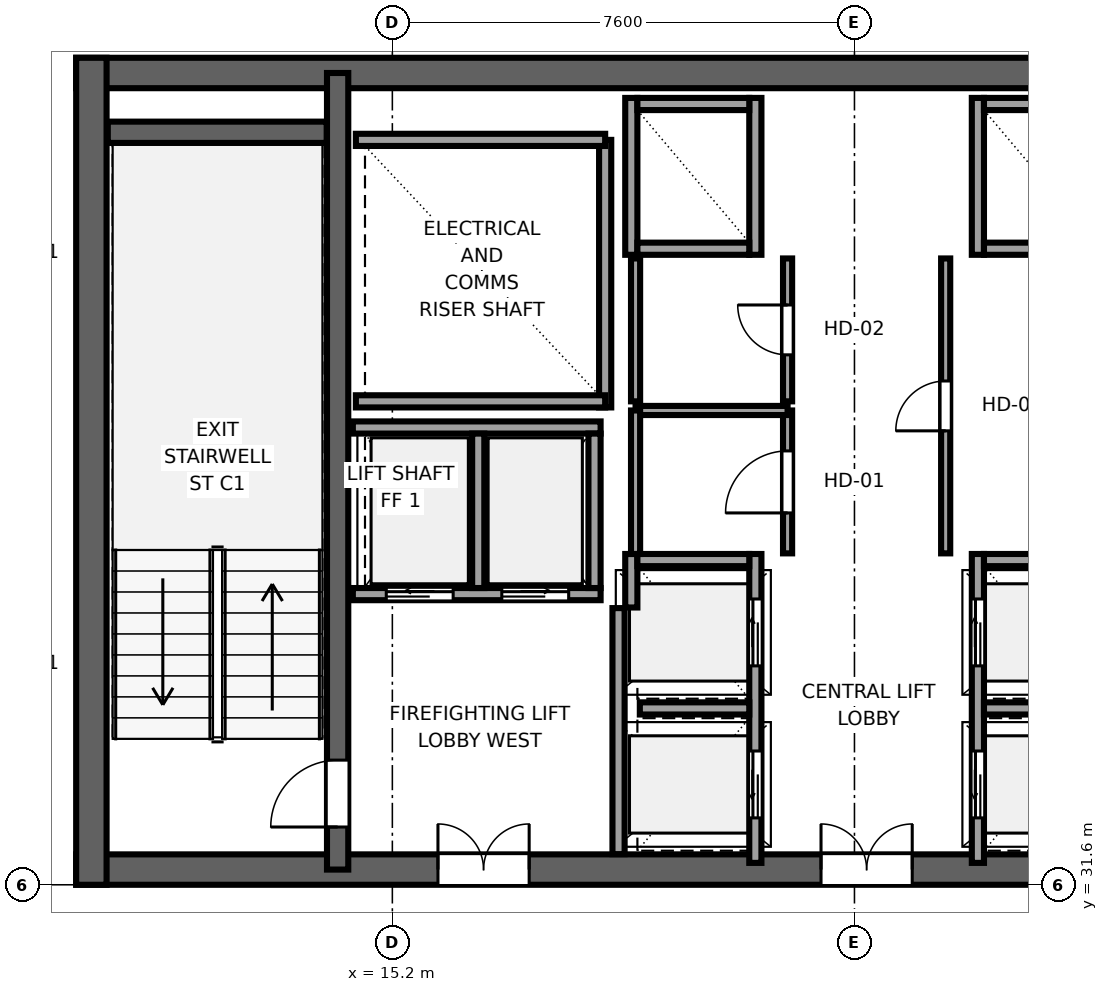
"""IFC4 building model, lengths in metres.
Left out: names, types, materials, properties, quantities, classifications, styles, units other than length and angle.
Written with IfcOpenShell. Run it as: python <this file> out.ifc"""

import sys

from ifc_helpers import new_model, si_unit, direction, frame, frame_2d, origin, place, context, subcontext, project, spatial, rectangle, extrude, source, transform, mapped, element, fill, save


model = new_model("IFC4")
c1 = context("Model", 3, precision=1e-05, world=origin(), true_north=direction((0.0, 1.0)))
c2 = subcontext(c1, "Body", "Model", "MODEL_VIEW")
j1 = project(units=[si_unit("LENGTHUNIT", "METRE"), si_unit("PLANEANGLEUNIT", "RADIAN")], contexts=[c1])
p1 = place(None, origin())
s1 = spatial("IfcSite", under=j1, at=p1, CompositionType="ELEMENT")
p2 = place(p1, origin())
s2 = spatial("IfcBuilding", under=s1, at=p2, CompositionType="ELEMENT")
p3 = place(p2, frame((0.0, 0.0, 213.25)))
s3 = spatial("IfcBuildingStorey", under=s2, at=p3, CompositionType="ELEMENT", Elevation=213.25)
p4 = place(p3, frame((10.0, 31.85, 0.0), z_axis=(0.0, 0.0, 1.0), x_axis=(1.0, 0.0, 0.0)))
e1 = element("IfcWall", 1, at=p4, inside=s3, PredefinedType="SHEAR", context=c2, shape_type="SweptSolid", body=[
    extrude(rectangle(XDim=26.0, YDim=0.5, at=frame_2d((13.0, 0.0))), origin(), (0.0, 0.0, 1.0), 3.55),
])
p5 = place(p4, frame((7.45, 0.0, 0.0), z_axis=(0.0, 0.0, 1.0), x_axis=(-1.0, 0.0, 0.0)))
e2 = element("IfcOpeningElement", 2, at=p5, cuts=e1, PredefinedType="OPENING", context=c2, shape_type="SweptSolid", body=[
    extrude(rectangle(XDim=1.5, YDim=2.04, at=frame_2d((0.75, 1.02))), frame((0.0, 0.26, 0.0), z_axis=(0.0, -1.0, 0.0), x_axis=(1.0, 0.0, 0.0)), (0.0, 0.0, 1.0), 0.52),
])
p6 = place(p4, frame((13.75, 0.0, 0.0), z_axis=(0.0, 0.0, 1.0), x_axis=(-1.0, 0.0, 0.0)))
e3 = element("IfcOpeningElement", 3, at=p6, cuts=e1, PredefinedType="OPENING", context=c2, shape_type="SweptSolid", body=[
    extrude(rectangle(XDim=1.5, YDim=2.04, at=frame_2d((0.75, 1.02))), frame((0.0, 0.26, 0.0), z_axis=(0.0, -1.0, 0.0), x_axis=(1.0, 0.0, 0.0)), (0.0, 0.0, 1.0), 0.52),
])
p7 = place(p4, frame((20.05, 0.0, 0.0), z_axis=(0.0, 0.0, 1.0), x_axis=(-1.0, 0.0, 0.0)))
e4 = element("IfcOpeningElement", 4, at=p7, cuts=e1, PredefinedType="OPENING", context=c2, shape_type="SweptSolid", body=[
    extrude(rectangle(XDim=1.5, YDim=2.04, at=frame_2d((0.75, 1.02))), frame((0.0, 0.26, 0.0), z_axis=(0.0, -1.0, 0.0), x_axis=(1.0, 0.0, 0.0)), (0.0, 0.0, 1.0), 0.52),
])
p8 = place(p3, frame((10.0, 44.95, 0.0), z_axis=(0.0, 0.0, 1.0), x_axis=(1.0, 0.0, 0.0)))
e5 = element("IfcWall", 5, at=p8, inside=s3, PredefinedType="SHEAR", context=c2, shape_type="SweptSolid", body=[
    extrude(rectangle(XDim=26.0, YDim=0.5, at=frame_2d((13.0, 0.0))), origin(), (0.0, 0.0, 1.0), 3.55),
])
p9 = place(p3, frame((10.25, 31.6, 0.0), z_axis=(0.0, 0.0, 1.0), x_axis=(0.0, 1.0, 0.0)))
e6 = element("IfcWall", 6, at=p9, inside=s3, PredefinedType="SHEAR", context=c2, shape_type="SweptSolid", body=[
    extrude(rectangle(XDim=13.6, YDim=0.5, at=frame_2d((6.8, 0.0))), origin(), (0.0, 0.0, 1.0), 3.55),
])
p10 = place(p3, frame((14.3, 31.85, 0.0), z_axis=(0.0, 0.0, 1.0), x_axis=(0.0, 1.0, 0.0)))
e7 = element("IfcWall", 7, at=p10, inside=s3, PredefinedType="SHEAR", context=c2, shape_type="SweptSolid", body=[
    extrude(rectangle(XDim=13.1, YDim=0.35, at=frame_2d((6.55, 0.0))), origin(), (0.0, 0.0, 1.0), 3.55),
])
p11 = place(p10, frame((0.7, 0.0, 0.0)))
e8 = element("IfcOpeningElement", 8, at=p11, cuts=e7, PredefinedType="OPENING", context=c2, shape_type="SweptSolid", body=[
    extrude(rectangle(XDim=1.1, YDim=2.12, at=frame_2d((0.55, 1.06))), frame((0.0, 0.185, 0.0), z_axis=(0.0, -1.0, 0.0), x_axis=(1.0, 0.0, 0.0)), (0.0, 0.0, 1.0), 0.37),
])
p12 = place(p3, frame((10.52, 43.975, 0.0), z_axis=(0.0, 0.0, 1.0), x_axis=(1.0, 0.0, 0.0)))
e9 = element("IfcWall", 9, at=p12, inside=s3, PredefinedType="SHEAR", context=c2, shape_type="SweptSolid", body=[
    extrude(rectangle(XDim=3.6, YDim=0.35, at=frame_2d((1.8, 0.0))), origin(), (0.0, 0.0, 1.0), 3.55),
])
p13 = place(p3, frame((18.7, 39.45, 0.0), z_axis=(0.0, 0.0, 1.0), x_axis=(0.0, 1.0, 0.0)))
e10 = element("IfcWall", 10, at=p13, inside=s3, PredefinedType="SOLIDWALL", context=c2, shape_type="SweptSolid", body=[
    extrude(rectangle(XDim=4.4, YDim=0.2, at=frame_2d((2.2, 0.0))), origin(), (0.0, 0.0, 1.0), 3.37),
])
for number, where, z_axis, x_axis in (
    (11, (14.6, 39.55, 0.0), (0.0, 0.0, 1.0), (1.0, 0.0, 0.0)),
    (12, (14.6, 43.85, 0.0), (0.0, 0.0, 1.0), (1.0, 0.0, 0.0)),
):
    element("IfcWall", number, at=place(p3, frame(where, z_axis=z_axis, x_axis=x_axis)), inside=s3, PredefinedType="SOLIDWALL", context=c2, shape_type="SweptSolid", body=[
        extrude(rectangle(XDim=4.1, YDim=0.2, at=frame_2d((2.05, 0.0))), origin(), (0.0, 0.0, 1.0), 3.37),
    ])
p14 = place(p3, frame((18.92, 32.104, 0.0), z_axis=(0.0, 0.0, 1.0), x_axis=(0.0, 1.0, 0.0)))
e13 = element("IfcWall", 13, at=p14, inside=s3, PredefinedType="SOLIDWALL", context=c2, shape_type="SweptSolid", body=[
    extrude(rectangle(XDim=4.046, YDim=0.2, at=frame_2d((2.023, 0.0))), origin(), (0.0, 0.0, 1.0), 3.37),
])
p15 = place(p3, frame((21.17, 31.96, 0.0), z_axis=(0.0, 0.0, 1.0), x_axis=(0.0, 1.0, 0.0)))
e14 = element("IfcWall", 14, at=p15, inside=s3, PredefinedType="SOLIDWALL", context=c2, shape_type="SweptSolid", body=[
    extrude(rectangle(XDim=5.08, YDim=0.2, at=frame_2d((2.54, 0.0))), origin(), (0.0, 0.0, 1.0), 3.37),
])
p16 = place(p15, frame((0.74, 0.0, 0.0)))
e15 = element("IfcOpeningElement", 15, at=p16, cuts=e14, PredefinedType="OPENING", context=c2, shape_type="SweptSolid", body=[
    extrude(rectangle(XDim=1.1, YDim=2.12, at=frame_2d((0.55, 1.06))), frame((0.0, 0.11, 0.0), z_axis=(0.0, -1.0, 0.0), x_axis=(1.0, 0.0, 0.0)), (0.0, 0.0, 1.0), 0.22),
])
p17 = place(p15, frame((3.24, 0.0, 0.0)))
e16 = element("IfcOpeningElement", 16, at=p17, cuts=e14, PredefinedType="OPENING", context=c2, shape_type="SweptSolid", body=[
    extrude(rectangle(XDim=1.1, YDim=2.12, at=frame_2d((0.55, 1.06))), frame((0.0, 0.11, 0.0), z_axis=(0.0, -1.0, 0.0), x_axis=(1.0, 0.0, 0.0)), (0.0, 0.0, 1.0), 0.22),
])
p18 = place(p3, frame((19.13, 36.16, 0.0), z_axis=(0.0, 0.0, 1.0), x_axis=(0.0, 1.0, 0.0)))
e17 = element("IfcWall", 17, at=p18, inside=s3, PredefinedType="SOLIDWALL", context=c2, shape_type="SweptSolid", body=[
    extrude(rectangle(XDim=0.88, YDim=0.2, at=frame_2d((0.44, 0.0))), origin(), (0.0, 0.0, 1.0), 3.37),
])
p19 = place(p3, frame((19.23, 36.94, 0.0), z_axis=(0.0, 0.0, 1.0), x_axis=(1.0, 0.0, 0.0)))
e18 = element("IfcWall", 18, at=p19, inside=s3, PredefinedType="SOLIDWALL", context=c2, shape_type="SweptSolid", body=[
    extrude(rectangle(XDim=1.84, YDim=0.2, at=frame_2d((0.92, 0.0))), origin(), (0.0, 0.0, 1.0), 3.37),
])
p20 = place(p3, frame((19.27, 34.5, 0.0), z_axis=(0.0, 0.0, 1.0), x_axis=(1.0, 0.0, 0.0)))
e19 = element("IfcWall", 19, at=p20, inside=s3, PredefinedType="SOLIDWALL", context=c2, shape_type="SweptSolid", body=[
    extrude(rectangle(XDim=1.8, YDim=0.2, at=frame_2d((0.9, 0.0))), origin(), (0.0, 0.0, 1.0), 3.37),
])
for number, where, z_axis, x_axis in (
    (20, (21.17, 41.96, 0.0), (0.0, 0.0, 1.0), (0.0, 1.0, 0.0)),
    (21, (19.13, 41.96, 0.0), (0.0, 0.0, 1.0), (0.0, 1.0, 0.0)),
):
    element("IfcWall", number, at=place(p3, frame(where, z_axis=z_axis, x_axis=x_axis)), inside=s3, PredefinedType="SOLIDWALL", context=c2, shape_type="SweptSolid", body=[
        extrude(rectangle(XDim=2.58, YDim=0.2, at=frame_2d((1.29, 0.0))), origin(), (0.0, 0.0, 1.0), 3.37),
    ])
for number, where, z_axis, x_axis in (
    (22, (19.23, 42.06, 0.0), (0.0, 0.0, 1.0), (1.0, 0.0, 0.0)),
    (23, (19.23, 44.44, 0.0), (0.0, 0.0, 1.0), (1.0, 0.0, 0.0)),
):
    element("IfcWall", number, at=place(p3, frame(where, z_axis=z_axis, x_axis=x_axis)), inside=s3, PredefinedType="SOLIDWALL", context=c2, shape_type="SweptSolid", body=[
        extrude(rectangle(XDim=1.84, YDim=0.2, at=frame_2d((0.92, 0.0))), origin(), (0.0, 0.0, 1.0), 3.37),
    ])
p21 = place(p3, frame((14.55, 36.38, 0.0), z_axis=(0.0, 0.0, 1.0), x_axis=(1.0, 0.0, 0.0)))
e24 = element("IfcWall", 24, at=p21, inside=s3, PredefinedType="SOLIDWALL", context=c2, shape_type="SweptSolid", body=[
    extrude(rectangle(XDim=4.075, YDim=0.2, at=frame_2d((2.038, 0.0))), origin(), (0.0, 0.0, 1.0), 3.37),
])
p22 = place(p21, frame((0.55, 0.0, 0.0)))
e25 = element("IfcOpeningElement", 25, at=p22, cuts=e24, PredefinedType="OPENING", context=c2, shape_type="SweptSolid", body=[
    extrude(rectangle(XDim=1.1, YDim=2.12, at=frame_2d((0.55, 1.06))), frame((0.0, 0.11, 0.0), z_axis=(0.0, -1.0, 0.0), x_axis=(1.0, 0.0, 0.0)), (0.0, 0.0, 1.0), 0.22),
])
p23 = place(p21, frame((2.45, 0.0, 0.0)))
e26 = element("IfcOpeningElement", 26, at=p23, cuts=e24, PredefinedType="OPENING", context=c2, shape_type="SweptSolid", body=[
    extrude(rectangle(XDim=1.1, YDim=2.12, at=frame_2d((0.55, 1.06))), frame((0.0, 0.11, 0.0), z_axis=(0.0, -1.0, 0.0), x_axis=(1.0, 0.0, 0.0)), (0.0, 0.0, 1.0), 0.22),
])
p24 = place(p3, frame((14.55, 39.12, 0.0), z_axis=(0.0, 0.0, 1.0), x_axis=(1.0, 0.0, 0.0)))
e27 = element("IfcWall", 27, at=p24, inside=s3, PredefinedType="SOLIDWALL", context=c2, shape_type="SweptSolid", body=[
    extrude(rectangle(XDim=4.075, YDim=0.2, at=frame_2d((2.038, 0.0))), origin(), (0.0, 0.0, 1.0), 3.37),
])
for number, where, z_axis, x_axis in (
    (28, (18.525, 36.48, 0.0), (0.0, 0.0, 1.0), (0.0, 1.0, 0.0)),
    (29, (16.613, 36.48, 0.0), (0.0, 0.0, 1.0), (0.0, 1.0, 0.0)),
):
    element("IfcWall", number, at=place(p3, frame(where, z_axis=z_axis, x_axis=x_axis)), inside=s3, PredefinedType="SOLIDWALL", context=c2, shape_type="SweptSolid", body=[
        extrude(rectangle(XDim=2.54, YDim=0.2, at=frame_2d((1.27, 0.0))), origin(), (0.0, 0.0, 1.0), 3.37),
    ])
p25 = place(p3, frame((24.83, 31.96, 0.0), z_axis=(0.0, 0.0, 1.0), x_axis=(0.0, 1.0, 0.0)))
e30 = element("IfcWall", 30, at=p25, inside=s3, PredefinedType="SOLIDWALL", context=c2, shape_type="SweptSolid", body=[
    extrude(rectangle(XDim=5.08, YDim=0.2, at=frame_2d((2.54, 0.0))), origin(), (0.0, 0.0, 1.0), 3.37),
])
p26 = place(p25, frame((0.74, 0.0, 0.0)))
e31 = element("IfcOpeningElement", 31, at=p26, cuts=e30, PredefinedType="OPENING", context=c2, shape_type="SweptSolid", body=[
    extrude(rectangle(XDim=1.1, YDim=2.12, at=frame_2d((0.55, 1.06))), frame((0.0, 0.11, 0.0), z_axis=(0.0, -1.0, 0.0), x_axis=(1.0, 0.0, 0.0)), (0.0, 0.0, 1.0), 0.22),
])
p27 = place(p25, frame((3.24, 0.0, 0.0)))
e32 = element("IfcOpeningElement", 32, at=p27, cuts=e30, PredefinedType="OPENING", context=c2, shape_type="SweptSolid", body=[
    extrude(rectangle(XDim=1.1, YDim=2.12, at=frame_2d((0.55, 1.06))), frame((0.0, 0.11, 0.0), z_axis=(0.0, -1.0, 0.0), x_axis=(1.0, 0.0, 0.0)), (0.0, 0.0, 1.0), 0.22),
])
p28 = place(p3, frame((24.93, 36.94, 0.0), z_axis=(0.0, 0.0, 1.0), x_axis=(1.0, 0.0, 0.0)))
e33 = element("IfcWall", 33, at=p28, inside=s3, PredefinedType="SOLIDWALL", context=c2, shape_type="SweptSolid", body=[
    extrude(rectangle(XDim=1.84, YDim=0.2, at=frame_2d((0.92, 0.0))), origin(), (0.0, 0.0, 1.0), 3.37),
])
p29 = place(p3, frame((24.93, 34.5, 0.0), z_axis=(0.0, 0.0, 1.0), x_axis=(1.0, 0.0, 0.0)))
e34 = element("IfcWall", 34, at=p29, inside=s3, PredefinedType="SOLIDWALL", context=c2, shape_type="SweptSolid", body=[
    extrude(rectangle(XDim=1.8, YDim=0.2, at=frame_2d((0.9, 0.0))), origin(), (0.0, 0.0, 1.0), 3.37),
])
p30 = place(p3, frame((24.83, 41.96, 0.0), z_axis=(0.0, 0.0, 1.0), x_axis=(0.0, 1.0, 0.0)))
e35 = element("IfcWall", 35, at=p30, inside=s3, PredefinedType="SOLIDWALL", context=c2, shape_type="SweptSolid", body=[
    extrude(rectangle(XDim=2.58, YDim=0.2, at=frame_2d((1.29, 0.0))), origin(), (0.0, 0.0, 1.0), 3.37),
])
for number, where, z_axis, x_axis in (
    (36, (24.93, 42.06, 0.0), (0.0, 0.0, 1.0), (1.0, 0.0, 0.0)),
    (37, (24.93, 44.44, 0.0), (0.0, 0.0, 1.0), (1.0, 0.0, 0.0)),
):
    element("IfcWall", number, at=place(p3, frame(where, z_axis=z_axis, x_axis=x_axis)), inside=s3, PredefinedType="SOLIDWALL", context=c2, shape_type="SweptSolid", body=[
        extrude(rectangle(XDim=1.84, YDim=0.2, at=frame_2d((0.92, 0.0))), origin(), (0.0, 0.0, 1.0), 3.37),
    ])
p31 = place(p3, frame((21.7, 37.05, 0.0), z_axis=(0.0, 0.0, 1.0), x_axis=(0.0, 1.0, 0.0)))
e38 = element("IfcWall", 38, at=p31, inside=s3, PredefinedType="PARTITIONING", context=c2, shape_type="SweptSolid", body=[
    extrude(rectangle(XDim=2.35, YDim=0.15, at=frame_2d((1.175, 0.0))), origin(), (0.0, 0.0, 1.0), 3.37),
])
p32 = place(p31, frame((0.665, 0.0, 0.0)))
e39 = element("IfcOpeningElement", 39, at=p32, cuts=e38, PredefinedType="OPENING", context=c2, shape_type="SweptSolid", body=[
    extrude(rectangle(XDim=1.02, YDim=2.03, at=frame_2d((0.51, 1.015))), frame((0.0, 0.085, 0.0), z_axis=(0.0, -1.0, 0.0), x_axis=(1.0, 0.0, 0.0)), (0.0, 0.0, 1.0), 0.17),
])
p33 = place(p3, frame((19.2, 39.4, 0.0), z_axis=(0.0, 0.0, 1.0), x_axis=(1.0, 0.0, 0.0)))
e40 = element("IfcWall", 40, at=p33, inside=s3, PredefinedType="PARTITIONING", context=c2, shape_type="SweptSolid", body=[
    extrude(rectangle(XDim=2.5, YDim=0.15, at=frame_2d((1.25, 0.0))), origin(), (0.0, 0.0, 1.0), 3.37),
])
p34 = place(p3, frame((19.2, 37.04, 0.0), z_axis=(0.0, 0.0, 1.0), x_axis=(0.0, 1.0, 0.0)))
e41 = element("IfcWall", 41, at=p34, inside=s3, PredefinedType="PARTITIONING", context=c2, shape_type="SweptSolid", body=[
    extrude(rectangle(XDim=2.36, YDim=0.15, at=frame_2d((1.18, 0.0))), origin(), (0.0, 0.0, 1.0), 3.37),
])
p35 = place(p3, frame((21.7, 39.55, 0.0), z_axis=(0.0, 0.0, 1.0), x_axis=(0.0, 1.0, 0.0)))
e42 = element("IfcWall", 42, at=p35, inside=s3, PredefinedType="PARTITIONING", context=c2, shape_type="SweptSolid", body=[
    extrude(rectangle(XDim=2.35, YDim=0.15, at=frame_2d((1.175, 0.0))), origin(), (0.0, 0.0, 1.0), 3.37),
])
p36 = place(p35, frame((0.765, 0.0, 0.0)))
e43 = element("IfcOpeningElement", 43, at=p36, cuts=e42, PredefinedType="OPENING", context=c2, shape_type="SweptSolid", body=[
    extrude(rectangle(XDim=0.82, YDim=2.01, at=frame_2d((0.41, 1.005))), frame((0.0, 0.085, 0.0), z_axis=(0.0, -1.0, 0.0), x_axis=(1.0, 0.0, 0.0)), (0.0, 0.0, 1.0), 0.17),
])
p37 = place(p3, frame((19.2, 39.55, 0.0), z_axis=(0.0, 0.0, 1.0), x_axis=(0.0, 1.0, 0.0)))
e44 = element("IfcWall", 44, at=p37, inside=s3, PredefinedType="PARTITIONING", context=c2, shape_type="SweptSolid", body=[
    extrude(rectangle(XDim=2.35, YDim=0.15, at=frame_2d((1.175, 0.0))), origin(), (0.0, 0.0, 1.0), 3.37),
])
p38 = place(p3, frame((24.3, 37.05, 0.0), z_axis=(0.0, 0.0, 1.0), x_axis=(0.0, 1.0, 0.0)))
e45 = element("IfcWall", 45, at=p38, inside=s3, PredefinedType="PARTITIONING", context=c2, shape_type="SweptSolid", body=[
    extrude(rectangle(XDim=4.85, YDim=0.15, at=frame_2d((2.425, 0.0))), origin(), (0.0, 0.0, 1.0), 3.37),
])
p39 = place(p38, frame((2.015, 0.0, 0.0)))
e46 = element("IfcOpeningElement", 46, at=p39, cuts=e45, PredefinedType="OPENING", context=c2, shape_type="SweptSolid", body=[
    extrude(rectangle(XDim=0.82, YDim=2.01, at=frame_2d((0.41, 1.005))), frame((0.0, 0.085, 0.0), z_axis=(0.0, -1.0, 0.0), x_axis=(1.0, 0.0, 0.0)), (0.0, 0.0, 1.0), 0.17),
])
m1 = source(origin(), c2, "Body", "SweptSolid", [
    extrude(rectangle(XDim=1.1, YDim=2.12, at=frame_2d((0.55, 1.06))), frame((0.0, 0.025, 0.0), z_axis=(0.0, -1.0, 0.0), x_axis=(1.0, 0.0, 0.0)), (0.0, 0.0, 1.0), 0.05),
])
p40 = place(p11, origin())
e47 = element("IfcDoor", 47, at=p40, inside=s3, OperationType="SINGLE_SWING_LEFT", PredefinedType="DOOR", context=c2, shape_type="MappedRepresentation", body=[
    mapped(m1, transform((0.0, 0.0, 0.0), x_axis=(1.0, 0.0, 0.0), y_axis=(0.0, 1.0, 0.0), z_axis=(0.0, 0.0, 1.0), scale=1.0)),
])
fill(e8, e47)
m2 = source(origin(), c2, "Body", "SweptSolid", [
    extrude(rectangle(XDim=1.5, YDim=2.04, at=frame_2d((0.75, 1.02))), frame((0.0, 0.025, 0.0), z_axis=(0.0, -1.0, 0.0), x_axis=(1.0, 0.0, 0.0)), (0.0, 0.0, 1.0), 0.05),
])
p41 = place(p5, origin())
e48 = element("IfcDoor", 48, at=p41, inside=s3, OperationType="DOUBLE_DOOR_SINGLE_SWING", PredefinedType="DOOR", context=c2, shape_type="MappedRepresentation", body=[
    mapped(m2, transform((0.0, 0.0, 0.0), x_axis=(1.0, 0.0, 0.0), y_axis=(0.0, 1.0, 0.0), z_axis=(0.0, 0.0, 1.0), scale=1.0)),
])
fill(e2, e48)
p42 = place(p6, origin())
e49 = element("IfcDoor", 49, at=p42, inside=s3, OperationType="DOUBLE_DOOR_SINGLE_SWING", PredefinedType="DOOR", context=c2, shape_type="MappedRepresentation", body=[
    mapped(m2, transform((0.0, 0.0, 0.0), x_axis=(1.0, 0.0, 0.0), y_axis=(0.0, 1.0, 0.0), z_axis=(0.0, 0.0, 1.0), scale=1.0)),
])
fill(e3, e49)
m3 = source(origin(), c2, "Body", "SweptSolid", [
    extrude(rectangle(XDim=1.1, YDim=2.12, at=frame_2d((0.55, 1.06))), frame((0.0, 0.025, 0.0), z_axis=(0.0, -1.0, 0.0), x_axis=(1.0, 0.0, 0.0)), (0.0, 0.0, 1.0), 0.05),
])
p43 = place(p16, origin())
e50 = element("IfcDoor", 50, at=p43, inside=s3, OperationType="SLIDING_TO_LEFT", PredefinedType="DOOR", context=c2, shape_type="MappedRepresentation", body=[
    mapped(m3, transform((0.0, 0.0, 0.0), x_axis=(1.0, 0.0, 0.0), y_axis=(0.0, 1.0, 0.0), z_axis=(0.0, 0.0, 1.0), scale=1.0)),
])
fill(e15, e50)
p44 = place(p17, origin())
e51 = element("IfcDoor", 51, at=p44, inside=s3, OperationType="SLIDING_TO_RIGHT", PredefinedType="DOOR", context=c2, shape_type="MappedRepresentation", body=[
    mapped(m3, transform((0.0, 0.0, 0.0), x_axis=(1.0, 0.0, 0.0), y_axis=(0.0, 1.0, 0.0), z_axis=(0.0, 0.0, 1.0), scale=1.0)),
])
fill(e16, e51)
p45 = place(p22, origin())
e52 = element("IfcDoor", 52, at=p45, inside=s3, OperationType="SLIDING_TO_LEFT", PredefinedType="DOOR", context=c2, shape_type="MappedRepresentation", body=[
    mapped(m3, transform((0.0, 0.0, 0.0), x_axis=(1.0, 0.0, 0.0), y_axis=(0.0, 1.0, 0.0), z_axis=(0.0, 0.0, 1.0), scale=1.0)),
])
fill(e25, e52)
p46 = place(p23, origin())
e53 = element("IfcDoor", 53, at=p46, inside=s3, OperationType="SLIDING_TO_RIGHT", PredefinedType="DOOR", context=c2, shape_type="MappedRepresentation", body=[
    mapped(m3, transform((0.0, 0.0, 0.0), x_axis=(1.0, 0.0, 0.0), y_axis=(0.0, 1.0, 0.0), z_axis=(0.0, 0.0, 1.0), scale=1.0)),
])
fill(e26, e53)
p47 = place(p26, origin())
e54 = element("IfcDoor", 54, at=p47, inside=s3, OperationType="SLIDING_TO_LEFT", PredefinedType="DOOR", context=c2, shape_type="MappedRepresentation", body=[
    mapped(m3, transform((0.0, 0.0, 0.0), x_axis=(1.0, 0.0, 0.0), y_axis=(0.0, 1.0, 0.0), z_axis=(0.0, 0.0, 1.0), scale=1.0)),
])
fill(e31, e54)
p48 = place(p27, origin())
e55 = element("IfcDoor", 55, at=p48, inside=s3, OperationType="SLIDING_TO_RIGHT", PredefinedType="DOOR", context=c2, shape_type="MappedRepresentation", body=[
    mapped(m3, transform((0.0, 0.0, 0.0), x_axis=(1.0, 0.0, 0.0), y_axis=(0.0, 1.0, 0.0), z_axis=(0.0, 0.0, 1.0), scale=1.0)),
])
fill(e32, e55)
m4 = source(origin(), c2, "Body", "SweptSolid", [
    extrude(rectangle(XDim=1.02, YDim=2.03, at=frame_2d((0.51, 1.015))), frame((0.0, 0.025, 0.0), z_axis=(0.0, -1.0, 0.0), x_axis=(1.0, 0.0, 0.0)), (0.0, 0.0, 1.0), 0.05),
])
p49 = place(p32, origin())
e56 = element("IfcDoor", 56, at=p49, inside=s3, OperationType="SINGLE_SWING_LEFT", PredefinedType="DOOR", context=c2, shape_type="MappedRepresentation", body=[
    mapped(m4, transform((0.0, 0.0, 0.0), x_axis=(1.0, 0.0, 0.0), y_axis=(0.0, 1.0, 0.0), z_axis=(0.0, 0.0, 1.0), scale=1.0)),
])
fill(e39, e56)
m5 = source(origin(), c2, "Body", "SweptSolid", [
    extrude(rectangle(XDim=0.82, YDim=2.01, at=frame_2d((0.41, 1.005))), frame((0.0, 0.025, 0.0), z_axis=(0.0, -1.0, 0.0), x_axis=(1.0, 0.0, 0.0)), (0.0, 0.0, 1.0), 0.05),
])
p50 = place(p36, origin())
e57 = element("IfcDoor", 57, at=p50, inside=s3, OperationType="SINGLE_SWING_RIGHT", PredefinedType="DOOR", context=c2, shape_type="MappedRepresentation", body=[
    mapped(m5, transform((0.0, 0.0, 0.0), x_axis=(1.0, 0.0, 0.0), y_axis=(0.0, 1.0, 0.0), z_axis=(0.0, 0.0, 1.0), scale=1.0)),
])
fill(e43, e57)
p51 = place(p39, origin())
e58 = element("IfcDoor", 58, at=p51, inside=s3, OperationType="SINGLE_SWING_LEFT", PredefinedType="DOOR", context=c2, shape_type="MappedRepresentation", body=[
    mapped(m5, transform((0.0, 0.0, 0.0), x_axis=(1.0, 0.0, 0.0), y_axis=(0.0, 1.0, 0.0), z_axis=(0.0, 0.0, 1.0), scale=1.0)),
])
fill(e46, e58)
save(model, sys.argv[1])
